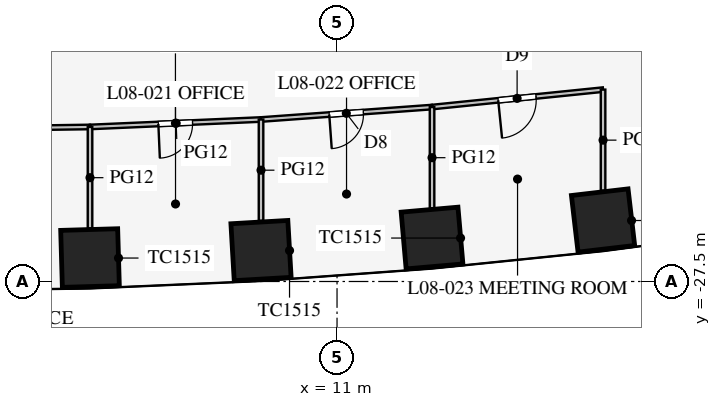
"""IFC4 building model, lengths in metres.
Left out: names, types, materials, properties, quantities, classifications, styles, units other than length and angle.
Written with IfcOpenShell. Run it as: python <this file> out.ifc"""

import sys

from ifc_helpers import new_model, si_unit, direction, frame, frame_2d, origin, origin_2d, place, context, subcontext, project, spatial, rectangle, extrude, element, fill, save


model = new_model("IFC4")
c1 = context("Model", 3, precision=1e-05, world=origin(), true_north=direction((0.0, 1.0)))
c2 = subcontext(c1, "Body", "Model", "MODEL_VIEW")
j1 = project(units=[si_unit("LENGTHUNIT", "METRE"), si_unit("PLANEANGLEUNIT", "RADIAN")], contexts=[c1])
p1 = place(None, origin())
s1 = spatial("IfcSite", under=j1, at=p1, CompositionType="ELEMENT")
p2 = place(p1, origin())
s2 = spatial("IfcBuilding", under=s1, at=p2, CompositionType="ELEMENT")
p3 = place(p2, frame((0.0, 0.0, 37.5)))
s3 = spatial("IfcBuildingStorey", under=s2, at=p3, CompositionType="ELEMENT", Elevation=37.5)
for number, where, z_axis, x_axis in (
    (1, (4.5, -26.883, 0.0), (0.0, 0.0, 1.0), (1.0, 0.029, 0.0)),
    (2, (9.0, -26.686, 0.0), (0.0, 0.0, 1.0), (0.998, 0.058, 0.0)),
    (3, (13.5, -26.357, 0.0), (0.0, 0.0, 1.0), (0.996, 0.087, 0.0)),
    (4, (18.0, -25.895, 0.0), (0.0, 0.0, 1.0), (0.993, 0.116, 0.0)),
):
    element("IfcColumn", number, at=place(p3, frame(where, z_axis=z_axis, x_axis=x_axis)), inside=s3, PredefinedType="COLUMN", context=c2, shape_type="SweptSolid", body=[
        extrude(rectangle(XDim=1.5, YDim=1.5, at=origin_2d()), origin(), (0.0, 0.0, 1.0), 4.2),
    ])
p4 = place(p3, frame((0.0, -23.499, 0.0), z_axis=(0.0, 0.0, 1.0), x_axis=(0.999894311967, 0.014538393859, 0.0)))
e5 = element("IfcWall", 5, at=p4, inside=s3, PredefinedType="PARTITIONING", context=c2, shape_type="SweptSolid", body=[
    extrude(rectangle(XDim=4.5, YDim=0.12, at=frame_2d((2.25, 0.0))), origin(), (0.0, 0.0, 1.0), 2.9),
])
p5 = place(p4, frame((1.8, 0.0, 0.15)))
e6 = element("IfcOpeningElement", 6, at=p5, cuts=e5, PredefinedType="OPENING", context=c2, shape_type="SweptSolid", body=[
    extrude(rectangle(XDim=0.9, YDim=2.1, at=frame_2d((0.45, 1.05))), frame((0.0, 0.07, 0.0), z_axis=(0.0, -1.0, 0.0), x_axis=(1.0, 0.0, 0.0)), (0.0, 0.0, 1.0), 0.14),
])
p6 = place(p3, frame((13.5, -22.91, 0.0), z_axis=(0.0, 0.0, 1.0), x_axis=(0.994833141332, 0.101523499286, 0.0)))
e7 = element("IfcWall", 7, at=p6, inside=s3, PredefinedType="PARTITIONING", context=c2, shape_type="SweptSolid", body=[
    extrude(rectangle(XDim=4.523, YDim=0.12, at=frame_2d((2.262, 0.0))), origin(), (0.0, 0.0, 1.0), 2.9),
])
p7 = place(p6, frame((1.75, 0.0, 0.15)))
e8 = element("IfcOpeningElement", 8, at=p7, cuts=e7, PredefinedType="OPENING", context=c2, shape_type="SweptSolid", body=[
    extrude(rectangle(XDim=1.0, YDim=2.1, at=frame_2d((0.5, 1.05))), frame((0.0, 0.07, 0.0), z_axis=(0.0, -1.0, 0.0), x_axis=(1.0, 0.0, 0.0)), (0.0, 0.0, 1.0), 0.14),
])
p8 = place(p3, frame((4.5, -23.433, 0.0), z_axis=(0.0, 0.0, 1.0), x_axis=(0.999052370647, 0.043524254212, 0.0)))
e9 = element("IfcWall", 9, at=p8, inside=s3, PredefinedType="PARTITIONING", context=c2, shape_type="SweptSolid", body=[
    extrude(rectangle(XDim=4.504, YDim=0.12, at=frame_2d((2.252, 0.0))), origin(), (0.0, 0.0, 1.0), 2.9),
])
p9 = place(p8, frame((1.8, 0.0, 0.15)))
e10 = element("IfcOpeningElement", 10, at=p9, cuts=e9, PredefinedType="OPENING", context=c2, shape_type="SweptSolid", body=[
    extrude(rectangle(XDim=0.9, YDim=2.1, at=frame_2d((0.45, 1.05))), frame((0.0, 0.07, 0.0), z_axis=(0.0, -1.0, 0.0), x_axis=(1.0, 0.0, 0.0)), (0.0, 0.0, 1.0), 0.14),
])
p10 = place(p3, frame((9.0, -23.237, 0.0), z_axis=(0.0, 0.0, 1.0), x_axis=(0.997363894896, 0.072562119306, 0.0)))
e11 = element("IfcWall", 11, at=p10, inside=s3, PredefinedType="PARTITIONING", context=c2, shape_type="SweptSolid", body=[
    extrude(rectangle(XDim=4.512, YDim=0.12, at=frame_2d((2.256, 0.0))), origin(), (0.0, 0.0, 1.0), 2.9),
])
p11 = place(p10, frame((1.8, 0.0, 0.15)))
e12 = element("IfcOpeningElement", 12, at=p11, cuts=e11, PredefinedType="OPENING", context=c2, shape_type="SweptSolid", body=[
    extrude(rectangle(XDim=0.9, YDim=2.1, at=frame_2d((0.45, 1.05))), frame((0.0, 0.07, 0.0), z_axis=(0.0, -1.0, 0.0), x_axis=(1.0, 0.0, 0.0)), (0.0, 0.0, 1.0), 0.14),
])
p12 = place(p3, frame((13.5, -22.91, 0.0), z_axis=(0.0, 0.0, 1.0), x_axis=(0.0, -1.0, 0.0)))
e13 = element("IfcWall", 13, at=p12, inside=s3, PredefinedType="PARTITIONING", context=c2, shape_type="SweptSolid", body=[
    extrude(rectangle(XDim=2.664, YDim=0.12, at=frame_2d((1.332, 0.0))), origin(), (0.0, 0.0, 1.0), 2.9),
])
p13 = place(p3, frame((18.0, -22.451, 0.0), z_axis=(0.0, 0.0, 1.0), x_axis=(0.0, -1.0, 0.0)))
e14 = element("IfcWall", 14, at=p13, inside=s3, PredefinedType="PARTITIONING", context=c2, shape_type="SweptSolid", body=[
    extrude(rectangle(XDim=2.659, YDim=0.12, at=frame_2d((1.33, 0.0))), origin(), (0.0, 0.0, 1.0), 2.9),
])
p14 = place(p3, frame((4.5, -23.433, 0.0), z_axis=(0.0, 0.0, 1.0), x_axis=(0.0, -1.0, 0.0)))
e15 = element("IfcWall", 15, at=p14, inside=s3, PredefinedType="PARTITIONING", context=c2, shape_type="SweptSolid", body=[
    extrude(rectangle(XDim=2.669, YDim=0.12, at=frame_2d((1.335, 0.0))), origin(), (0.0, 0.0, 1.0), 2.9),
])
p15 = place(p3, frame((9.0, -23.237, 0.0), z_axis=(0.0, 0.0, 1.0), x_axis=(0.0, -1.0, 0.0)))
e16 = element("IfcWall", 16, at=p15, inside=s3, PredefinedType="PARTITIONING", context=c2, shape_type="SweptSolid", body=[
    extrude(rectangle(XDim=2.667, YDim=0.12, at=frame_2d((1.334, 0.0))), origin(), (0.0, 0.0, 1.0), 2.9),
])
p16 = place(p9, frame((0.9, 0.0, 0.0), z_axis=(0.0, 0.0, 1.0), x_axis=(-1.0, 0.0, 0.0)))
e17 = element("IfcDoor", 17, at=p16, inside=s3, OperationType="SINGLE_SWING_RIGHT", PredefinedType="DOOR", context=c2, shape_type="SweptSolid", body=[
    extrude(rectangle(XDim=0.9, YDim=2.1, at=frame_2d((0.45, 1.05))), frame((0.0, 0.025, 0.0), z_axis=(0.0, -1.0, 0.0), x_axis=(1.0, 0.0, 0.0)), (0.0, 0.0, 1.0), 0.05),
])
fill(e10, e17)
p17 = place(p11, frame((0.9, 0.0, 0.0), z_axis=(0.0, 0.0, 1.0), x_axis=(-1.0, 0.0, 0.0)))
e18 = element("IfcDoor", 18, at=p17, inside=s3, OperationType="SINGLE_SWING_RIGHT", PredefinedType="DOOR", context=c2, shape_type="SweptSolid", body=[
    extrude(rectangle(XDim=0.9, YDim=2.1, at=frame_2d((0.45, 1.05))), frame((0.0, 0.025, 0.0), z_axis=(0.0, -1.0, 0.0), x_axis=(1.0, 0.0, 0.0)), (0.0, 0.0, 1.0), 0.05),
])
fill(e12, e18)
p18 = place(p7, frame((1.0, 0.0, 0.0), z_axis=(0.0, 0.0, 1.0), x_axis=(-1.0, 0.0, 0.0)))
e19 = element("IfcDoor", 19, at=p18, inside=s3, OperationType="SINGLE_SWING_RIGHT", PredefinedType="DOOR", context=c2, shape_type="SweptSolid", body=[
    extrude(rectangle(XDim=1.0, YDim=2.1, at=frame_2d((0.5, 1.05))), frame((0.0, 0.025, 0.0), z_axis=(0.0, -1.0, 0.0), x_axis=(1.0, 0.0, 0.0)), (0.0, 0.0, 1.0), 0.05),
])
fill(e8, e19)
save(model, sys.argv[1])
